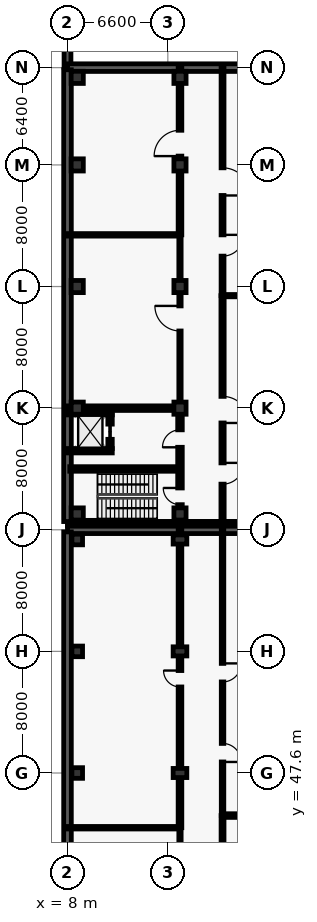
"""IFC4 building model, lengths in metres.
Left out: names, types, materials, properties, quantities, classifications, styles, units other than length and angle.
Written with IfcOpenShell. Run it as: python <this file> out.ifc"""

import sys

from ifc_helpers import new_model, si_unit, direction, frame, frame_2d, origin, origin_2d, place, context, subcontext, project, spatial, rectangle, extrude, element, fill, save


model = new_model("IFC4")
c1 = context("Model", 3, precision=1e-05, world=origin(), true_north=direction((0.0, 1.0)))
c2 = subcontext(c1, "Body", "Model", "MODEL_VIEW")
j1 = project(units=[si_unit("LENGTHUNIT", "METRE"), si_unit("PLANEANGLEUNIT", "RADIAN")], contexts=[c1])
p1 = place(None, origin())
s1 = spatial("IfcSite", under=j1, at=p1, CompositionType="ELEMENT")
p2 = place(p1, origin())
s2 = spatial("IfcBuilding", under=s1, at=p2, CompositionType="ELEMENT")
p3 = place(p2, frame((0.0, 0.0, -4.8)))
s3 = spatial("IfcBuildingStorey", under=s2, at=p3, CompositionType="ELEMENT", Elevation=-4.8)
for number, where, z_axis, x_axis in (
    (1, (8.64, 47.6, 0.0), (0.0, 0.0, 1.0), (1.0, 0.0, 0.0)),
    (2, (8.64, 55.6, 0.0), (0.0, 0.0, 1.0), (1.0, 0.0, 0.0)),
    (3, (8.64, 62.96, 0.0), (0.0, 0.0, 1.0), (1.0, 0.0, 0.0)),
):
    element("IfcColumn", number, at=place(p3, frame(where, z_axis=z_axis, x_axis=x_axis)), inside=s3, PredefinedType="COLUMN", context=c2, shape_type="SweptSolid", body=[
        extrude(rectangle(XDim=0.7, YDim=0.7, at=origin_2d()), origin(), (0.0, 0.0, 1.0), 4.8),
    ])
for number, where, z_axis, x_axis in (
    (4, (15.4, 47.6, 0.0), (0.0, 0.0, 1.0), (1.0, 0.0, 0.0)),
    (5, (15.4, 55.6, 0.0), (0.0, 0.0, 1.0), (1.0, 0.0, 0.0)),
    (6, (15.4, 62.96, 0.0), (0.0, 0.0, 1.0), (1.0, 0.0, 0.0)),
):
    element("IfcColumn", number, at=place(p3, frame(where, z_axis=z_axis, x_axis=x_axis)), inside=s3, PredefinedType="COLUMN", context=c2, shape_type="SweptSolid", body=[
        extrude(rectangle(XDim=0.6, YDim=0.9, at=origin_2d()), origin(), (0.0, 0.0, 1.0), 4.8),
    ])
for number, where, z_axis, x_axis in (
    (7, (8.64, 64.64, 0.0), (0.0, 0.0, 1.0), (1.0, 0.0, 0.0)),
    (8, (8.64, 71.6, 0.0), (0.0, 0.0, 1.0), (1.0, 0.0, 0.0)),
    (9, (8.64, 79.6, 0.0), (0.0, 0.0, 1.0), (1.0, 0.0, 0.0)),
    (10, (8.64, 87.6, 0.0), (0.0, 0.0, 1.0), (1.0, 0.0, 0.0)),
    (11, (8.64, 93.36, 0.0), (0.0, 0.0, 1.0), (1.0, 0.0, 0.0)),
    (12, (15.4, 64.64, 0.0), (0.0, 0.0, 1.0), (1.0, 0.0, 0.0)),
    (13, (15.4, 71.6, 0.0), (0.0, 0.0, 1.0), (1.0, 0.0, 0.0)),
    (14, (15.4, 79.6, 0.0), (0.0, 0.0, 1.0), (1.0, 0.0, 0.0)),
    (15, (15.4, 87.6, 0.0), (0.0, 0.0, 1.0), (1.0, 0.0, 0.0)),
    (16, (15.4, 93.36, 0.0), (0.0, 0.0, 1.0), (1.0, 0.0, 0.0)),
):
    element("IfcColumn", number, at=place(p3, frame(where, z_axis=z_axis, x_axis=x_axis)), inside=s3, PredefinedType="COLUMN", context=c2, shape_type="SweptSolid", body=[
        extrude(rectangle(XDim=0.8, YDim=0.8, at=origin_2d()), origin(), (0.0, 0.0, 1.0), 4.8),
    ])
p4 = place(p3, frame((8.0, 94.02, 0.0), z_axis=(0.0, 0.0, 1.0), x_axis=(0.0, 1.0, 0.0)))
e17 = element("IfcWall", 17, at=p4, inside=s3, PredefinedType="USERDEFINED", context=c2, shape_type="SweptSolid", body=[
    extrude(rectangle(XDim=7.96, YDim=0.45, at=frame_2d((3.98, 0.0))), origin(), (0.0, 0.0, 1.0), 4.53),
])
p5 = place(p3, frame((8.0, 63.6, 0.0), z_axis=(0.0, 0.0, 1.0), x_axis=(1.0, 0.0, 0.0)))
e18 = element("IfcWall", 18, at=p5, inside=s3, PredefinedType="USERDEFINED", context=c2, shape_type="SweptSolid", body=[
    extrude(rectangle(XDim=38.0, YDim=0.5, at=frame_2d((19.0, 0.0))), origin(), (0.0, 0.0, 1.0), 4.5),
])
p6 = place(p3, frame((8.0, 7.74, 0.0), z_axis=(0.0, 0.0, 1.0), x_axis=(0.0, 1.0, 0.0)))
e19 = element("IfcWall", 19, at=p6, inside=s3, PredefinedType="USERDEFINED", context=c2, shape_type="SweptSolid", body=[
    extrude(rectangle(XDim=55.72, YDim=0.5, at=frame_2d((27.86, 0.0))), origin(), (0.0, 0.0, 1.0), 4.5),
])
p7 = place(p3, frame((8.0, 94.0, 0.0), z_axis=(0.0, 0.0, 1.0), x_axis=(1.0, 0.0, 0.0)))
e20 = element("IfcWall", 20, at=p7, inside=s3, PredefinedType="USERDEFINED", context=c2, shape_type="SweptSolid", body=[
    extrude(rectangle(XDim=32.2, YDim=0.5, at=frame_2d((16.1, 0.0))), origin(), (0.0, 0.0, 1.0), 4.5),
])
p8 = place(p3, frame((40.2, 64.0, 0.0), z_axis=(0.0, 0.0, 1.0), x_axis=(-1.0, 0.0, 0.0)))
e21 = element("IfcWall", 21, at=p8, inside=s3, PredefinedType="SHEAR", context=c2, shape_type="SweptSolid", body=[
    extrude(rectangle(XDim=32.2, YDim=0.3, at=frame_2d((16.1, 0.0))), origin(), (0.0, 0.0, 1.0), 4.5),
])
p9 = place(p3, frame((8.0, 64.14, 0.0), z_axis=(0.0, 0.0, 1.0), x_axis=(0.0, 1.0, 0.0)))
e22 = element("IfcWall", 22, at=p9, inside=s3, PredefinedType="USERDEFINED", context=c2, shape_type="SweptSolid", body=[
    extrude(rectangle(XDim=29.72, YDim=0.5, at=frame_2d((14.86, 0.0))), origin(), (0.0, 0.0, 1.0), 4.5),
])
p10 = place(p3, frame((7.85, 71.6, 0.0), z_axis=(0.0, 0.0, 1.0), x_axis=(1.0, 0.0, 0.0)))
e23 = element("IfcWall", 23, at=p10, inside=s3, PredefinedType="SHEAR", context=c2, shape_type="SweptSolid", body=[
    extrude(rectangle(XDim=7.148, YDim=0.3, at=frame_2d((3.574, 0.0))), origin(), (0.0, 0.0, 1.0), 4.5),
])
p11 = place(p3, frame((15.4, 64.15, 0.0), z_axis=(0.0, 0.0, 1.0), x_axis=(0.0, 1.0, 0.0)))
e24 = element("IfcWall", 24, at=p11, inside=s3, PredefinedType="SHEAR", context=c2, shape_type="SweptSolid", body=[
    extrude(rectangle(XDim=7.048, YDim=0.3, at=frame_2d((3.524, 0.0))), origin(), (0.0, 0.0, 1.0), 4.5),
])
p12 = place(p11, frame((1.1, 0.0, 0.0)))
e25 = element("IfcOpeningElement", 25, at=p12, cuts=e24, PredefinedType="OPENING", context=c2, shape_type="SweptSolid", body=[
    extrude(rectangle(XDim=1.1, YDim=2.15, at=frame_2d((0.55, 1.075))), frame((0.0, 0.16, 0.0), z_axis=(0.0, -1.0, 0.0), x_axis=(1.0, 0.0, 0.0)), (0.0, 0.0, 1.0), 0.32),
])
p13 = place(p11, frame((4.875, 0.0, 0.0)))
e26 = element("IfcOpeningElement", 26, at=p13, cuts=e24, PredefinedType="OPENING", context=c2, shape_type="SweptSolid", body=[
    extrude(rectangle(XDim=1.15, YDim=2.2, at=frame_2d((0.575, 1.1))), frame((0.0, 0.16, 0.0), z_axis=(0.0, -1.0, 0.0), x_axis=(1.0, 0.0, 0.0)), (0.0, 0.0, 1.0), 0.32),
])
p14 = place(p3, frame((8.15, 67.6, 0.0), z_axis=(0.0, 0.0, 1.0), x_axis=(1.0, 0.0, 0.0)))
e27 = element("IfcWall", 27, at=p14, inside=s3, PredefinedType="SHEAR", context=c2, shape_type="SweptSolid", body=[
    extrude(rectangle(XDim=7.1, YDim=0.3, at=frame_2d((3.55, 0.0))), origin(), (0.0, 0.0, 1.0), 4.5),
])
for number, where, z_axis, x_axis in (
    (28, (8.055, 68.8, 0.0), (0.0, 0.0, 1.0), (1.0, 0.0, 0.0)),
    (29, (8.055, 71.3, 0.0), (0.0, 0.0, 1.0), (1.0, 0.0, 0.0)),
):
    element("IfcWall", number, at=place(p3, frame(where, z_axis=z_axis, x_axis=x_axis)), inside=s3, PredefinedType="SHEAR", context=c2, shape_type="SweptSolid", body=[
        extrude(rectangle(XDim=2.89, YDim=0.29, at=frame_2d((1.445, 0.0))), origin(), (0.0, 0.0, 1.0), 4.5),
    ])
p15 = place(p3, frame((10.8, 68.945, 0.0), z_axis=(0.0, 0.0, 1.0), x_axis=(0.0, 1.0, 0.0)))
e30 = element("IfcWall", 30, at=p15, inside=s3, PredefinedType="SHEAR", context=c2, shape_type="SweptSolid", body=[
    extrude(rectangle(XDim=2.21, YDim=0.29, at=frame_2d((1.105, 0.0))), origin(), (0.0, 0.0, 1.0), 4.5),
])
p16 = place(p15, frame((0.605, 0.0, 0.0)))
e31 = element("IfcOpeningElement", 31, at=p16, cuts=e30, PredefinedType="OPENING", context=c2, shape_type="SweptSolid", body=[
    extrude(rectangle(XDim=1.0, YDim=2.15, at=frame_2d((0.5, 1.075))), frame((0.0, 0.155, 0.0), z_axis=(0.0, -1.0, 0.0), x_axis=(1.0, 0.0, 0.0)), (0.0, 0.0, 1.0), 0.31),
])
p17 = place(p3, frame((15.4, 26.4, 0.0), z_axis=(0.0, 0.0, 1.0), x_axis=(0.0, 1.0, 0.0)))
e32 = element("IfcWall", 32, at=p17, inside=s3, PredefinedType="PARTITIONING", context=c2, shape_type="SweptSolid", body=[
    extrude(rectangle(XDim=17.6, YDim=0.15, at=frame_2d((8.8, 0.0))), origin(), (0.0, 0.0, 1.0), 3.65),
])
p18 = place(p17, frame((8.3, 0.0, 0.0)))
e33 = element("IfcOpeningElement", 33, at=p18, cuts=e32, PredefinedType="OPENING", context=c2, shape_type="SweptSolid", body=[
    extrude(rectangle(XDim=1.0, YDim=2.1, at=frame_2d((0.5, 1.05))), frame((0.0, 0.085, 0.0), z_axis=(0.0, -1.0, 0.0), x_axis=(1.0, 0.0, 0.0)), (0.0, 0.0, 1.0), 0.17),
])
p19 = place(p3, frame((15.4, 44.0, 0.0), z_axis=(0.0, 0.0, 1.0), x_axis=(0.0, 1.0, 0.0)))
e34 = element("IfcWall", 34, at=p19, inside=s3, PredefinedType="PARTITIONING", context=c2, shape_type="SweptSolid", body=[
    extrude(rectangle(XDim=19.6, YDim=0.24, at=frame_2d((9.8, 0.0))), origin(), (0.0, 0.0, 1.0), 3.65),
])
p20 = place(p19, frame((9.26, 0.0, 0.0)))
e35 = element("IfcOpeningElement", 35, at=p20, cuts=e34, PredefinedType="OPENING", context=c2, shape_type="SweptSolid", body=[
    extrude(rectangle(XDim=1.08, YDim=2.15, at=frame_2d((0.54, 1.075))), frame((0.0, 0.13, 0.0), z_axis=(0.0, -1.0, 0.0), x_axis=(1.0, 0.0, 0.0)), (0.0, 0.0, 1.0), 0.26),
])
p21 = place(p3, frame((18.2, 44.8, 0.0), z_axis=(0.0, 0.0, 1.0), x_axis=(0.0, -1.0, 0.0)))
e36 = element("IfcWall", 36, at=p21, inside=s3, PredefinedType="PARTITIONING", context=c2, shape_type="SweptSolid", body=[
    extrude(rectangle(XDim=18.8, YDim=0.19, at=frame_2d((9.4, 0.0))), origin(), (0.0, 0.0, 1.0), 4.5),
])
p22 = place(p21, frame((8.81, 0.0, 0.0)))
e37 = element("IfcOpeningElement", 37, at=p22, cuts=e36, PredefinedType="OPENING", context=c2, shape_type="SweptSolid", body=[
    extrude(rectangle(XDim=1.18, YDim=2.15, at=frame_2d((0.59, 1.075))), frame((0.0, 0.105, 0.0), z_axis=(0.0, -1.0, 0.0), x_axis=(1.0, 0.0, 0.0)), (0.0, 0.0, 1.0), 0.21),
])
p23 = place(p21, frame((13.964, 0.0, 0.0)))
e38 = element("IfcOpeningElement", 38, at=p23, cuts=e36, PredefinedType="OPENING", context=c2, shape_type="SweptSolid", body=[
    extrude(rectangle(XDim=1.4, YDim=2.25, at=frame_2d((0.7, 1.125))), frame((0.0, 0.105, 0.0), z_axis=(0.0, -1.0, 0.0), x_axis=(1.0, 0.0, 0.0)), (0.0, 0.0, 1.0), 0.21),
])
p24 = place(p3, frame((18.2, 63.6, 0.0), z_axis=(0.0, 0.0, 1.0), x_axis=(0.0, -1.0, 0.0)))
e39 = element("IfcWall", 39, at=p24, inside=s3, PredefinedType="PARTITIONING", context=c2, shape_type="SweptSolid", body=[
    extrude(rectangle(XDim=18.8, YDim=0.165, at=frame_2d((9.4, 0.0))), origin(), (0.0, 0.0, 1.0), 4.5),
])
p25 = place(p24, frame((8.79, 0.0, 0.0)))
e40 = element("IfcOpeningElement", 40, at=p25, cuts=e39, PredefinedType="OPENING", context=c2, shape_type="SweptSolid", body=[
    extrude(rectangle(XDim=1.22, YDim=2.2, at=frame_2d((0.61, 1.1))), frame((0.0, 0.093, 0.0), z_axis=(0.0, -1.0, 0.0), x_axis=(1.0, 0.0, 0.0)), (0.0, 0.0, 1.0), 0.185),
])
p26 = place(p24, frame((14.054, 0.0, 0.0)))
e41 = element("IfcOpeningElement", 41, at=p26, cuts=e39, PredefinedType="OPENING", context=c2, shape_type="SweptSolid", body=[
    extrude(rectangle(XDim=1.22, YDim=2.2, at=frame_2d((0.61, 1.1))), frame((0.0, 0.093, 0.0), z_axis=(0.0, -1.0, 0.0), x_axis=(1.0, 0.0, 0.0)), (0.0, 0.0, 1.0), 0.185),
])
p27 = place(p3, frame((8.0, 44.0, 0.0), z_axis=(0.0, 0.0, 1.0), x_axis=(1.0, 0.0, 0.0)))
e42 = element("IfcWall", 42, at=p27, inside=s3, PredefinedType="PARTITIONING", context=c2, shape_type="SweptSolid", body=[
    extrude(rectangle(XDim=7.4, YDim=0.165, at=frame_2d((3.7, 0.0))), origin(), (0.0, 0.0, 1.0), 4.5),
])
p28 = place(p3, frame((18.2, 44.8, 0.0), z_axis=(0.0, 0.0, 1.0), x_axis=(1.0, 0.0, 0.0)))
e43 = element("IfcWall", 43, at=p28, inside=s3, PredefinedType="PARTITIONING", context=c2, shape_type="SweptSolid", body=[
    extrude(rectangle(XDim=27.8, YDim=0.24, at=frame_2d((13.9, 0.0))), origin(), (0.0, 0.0, 1.0), 4.5),
])
p29 = place(p3, frame((15.4, 72.002, 0.0), z_axis=(0.0, 0.0, 1.0), x_axis=(0.0, 1.0, 0.0)))
e44 = element("IfcWall", 44, at=p29, inside=s3, PredefinedType="PARTITIONING", context=c2, shape_type="SweptSolid", body=[
    extrude(rectangle(XDim=10.998, YDim=0.15, at=frame_2d((5.499, 0.0))), origin(), (0.0, 0.0, 1.0), 3.65),
])
p30 = place(p29, frame((4.674, 0.0, 0.0)))
e45 = element("IfcOpeningElement", 45, at=p30, cuts=e44, PredefinedType="OPENING", context=c2, shape_type="SweptSolid", body=[
    extrude(rectangle(XDim=1.65, YDim=2.3, at=frame_2d((0.825, 1.15))), frame((0.0, 0.085, 0.0), z_axis=(0.0, -1.0, 0.0), x_axis=(1.0, 0.0, 0.0)), (0.0, 0.0, 1.0), 0.17),
])
p31 = place(p3, frame((15.4, 83.0, 0.0), z_axis=(0.0, 0.0, 1.0), x_axis=(0.0, 1.0, 0.0)))
e46 = element("IfcWall", 46, at=p31, inside=s3, PredefinedType="PARTITIONING", context=c2, shape_type="SweptSolid", body=[
    extrude(rectangle(XDim=11.0, YDim=0.24, at=frame_2d((5.5, 0.0))), origin(), (0.0, 0.0, 1.0), 3.65),
])
p32 = place(p31, frame((5.18, 0.0, 0.0)))
e47 = element("IfcOpeningElement", 47, at=p32, cuts=e46, PredefinedType="OPENING", context=c2, shape_type="SweptSolid", body=[
    extrude(rectangle(XDim=1.7, YDim=2.3, at=frame_2d((0.85, 1.15))), frame((0.0, 0.13, 0.0), z_axis=(0.0, -1.0, 0.0), x_axis=(1.0, 0.0, 0.0)), (0.0, 0.0, 1.0), 0.26),
])
p33 = place(p3, frame((18.2, 79.0, 0.0), z_axis=(0.0, 0.0, 1.0), x_axis=(0.0, -1.0, 0.0)))
e48 = element("IfcWall", 48, at=p33, inside=s3, PredefinedType="PARTITIONING", context=c2, shape_type="SweptSolid", body=[
    extrude(rectangle(XDim=15.0, YDim=0.21, at=frame_2d((7.5, 0.0))), origin(), (0.0, 0.0, 1.0), 4.5),
])
p34 = place(p33, frame((6.625, 0.0, 0.0)))
e49 = element("IfcOpeningElement", 49, at=p34, cuts=e48, PredefinedType="OPENING", context=c2, shape_type="SweptSolid", body=[
    extrude(rectangle(XDim=1.75, YDim=2.35, at=frame_2d((0.875, 1.175))), frame((0.0, 0.115, 0.0), z_axis=(0.0, -1.0, 0.0), x_axis=(1.0, 0.0, 0.0)), (0.0, 0.0, 1.0), 0.23),
])
p35 = place(p33, frame((11.0, 0.0, 0.0)))
e50 = element("IfcOpeningElement", 50, at=p35, cuts=e48, PredefinedType="OPENING", context=c2, shape_type="SweptSolid", body=[
    extrude(rectangle(XDim=1.4, YDim=2.25, at=frame_2d((0.7, 1.125))), frame((0.0, 0.115, 0.0), z_axis=(0.0, -1.0, 0.0), x_axis=(1.0, 0.0, 0.0)), (0.0, 0.0, 1.0), 0.23),
])
p36 = place(p3, frame((18.2, 94.0, 0.0), z_axis=(0.0, 0.0, 1.0), x_axis=(0.0, -1.0, 0.0)))
e51 = element("IfcWall", 51, at=p36, inside=s3, PredefinedType="PARTITIONING", context=c2, shape_type="SweptSolid", body=[
    extrude(rectangle(XDim=15.0, YDim=0.19, at=frame_2d((7.5, 0.0))), origin(), (0.0, 0.0, 1.0), 4.5),
])
p37 = place(p36, frame((6.59, 0.0, 0.0)))
e52 = element("IfcOpeningElement", 52, at=p37, cuts=e51, PredefinedType="OPENING", context=c2, shape_type="SweptSolid", body=[
    extrude(rectangle(XDim=1.82, YDim=2.35, at=frame_2d((0.91, 1.175))), frame((0.0, 0.105, 0.0), z_axis=(0.0, -1.0, 0.0), x_axis=(1.0, 0.0, 0.0)), (0.0, 0.0, 1.0), 0.21),
])
p38 = place(p36, frame((11.0, 0.0, 0.0)))
e53 = element("IfcOpeningElement", 53, at=p38, cuts=e51, PredefinedType="OPENING", context=c2, shape_type="SweptSolid", body=[
    extrude(rectangle(XDim=1.4, YDim=2.25, at=frame_2d((0.7, 1.125))), frame((0.0, 0.105, 0.0), z_axis=(0.0, -1.0, 0.0), x_axis=(1.0, 0.0, 0.0)), (0.0, 0.0, 1.0), 0.21),
])
p39 = place(p3, frame((8.0, 83.0, 0.0), z_axis=(0.0, 0.0, 1.0), x_axis=(1.0, 0.0, 0.0)))
e54 = element("IfcWall", 54, at=p39, inside=s3, PredefinedType="PARTITIONING", context=c2, shape_type="SweptSolid", body=[
    extrude(rectangle(XDim=7.4, YDim=0.165, at=frame_2d((3.7, 0.0))), origin(), (0.0, 0.0, 1.0), 4.5),
])
p40 = place(p3, frame((18.2, 79.0, 0.0), z_axis=(0.0, 0.0, 1.0), x_axis=(1.0, 0.0, 0.0)))
e55 = element("IfcWall", 55, at=p40, inside=s3, PredefinedType="PARTITIONING", context=c2, shape_type="SweptSolid", body=[
    extrude(rectangle(XDim=22.0, YDim=0.15, at=frame_2d((11.0, 0.0))), origin(), (0.0, 0.0, 1.0), 4.5),
])
p41 = place(p12, origin())
e56 = element("IfcDoor", 56, at=p41, inside=s3, OperationType="SINGLE_SWING_RIGHT", PredefinedType="DOOR", context=c2, shape_type="SweptSolid", body=[
    extrude(rectangle(XDim=1.1, YDim=2.15, at=frame_2d((0.55, 1.075))), frame((0.0, 0.025, 0.0), z_axis=(0.0, -1.0, 0.0), x_axis=(1.0, 0.0, 0.0)), (0.0, 0.0, 1.0), 0.05),
])
fill(e25, e56)
p42 = place(p13, origin())
e57 = element("IfcDoor", 57, at=p42, inside=s3, OperationType="SINGLE_SWING_LEFT", PredefinedType="DOOR", context=c2, shape_type="SweptSolid", body=[
    extrude(rectangle(XDim=1.15, YDim=2.2, at=frame_2d((0.575, 1.1))), frame((0.0, 0.025, 0.0), z_axis=(0.0, -1.0, 0.0), x_axis=(1.0, 0.0, 0.0)), (0.0, 0.0, 1.0), 0.05),
])
fill(e26, e57)
p43 = place(p16, origin())
e58 = element("IfcDoor", 58, at=p43, inside=s3, OperationType="SLIDING_TO_LEFT", PredefinedType="DOOR", context=c2, shape_type="SweptSolid", body=[
    extrude(rectangle(XDim=1.0, YDim=2.15, at=frame_2d((0.5, 1.075))), frame((0.0, 0.025, 0.0), z_axis=(0.0, -1.0, 0.0), x_axis=(1.0, 0.0, 0.0)), (0.0, 0.0, 1.0), 0.05),
])
fill(e31, e58)
p44 = place(p20, origin())
e59 = element("IfcDoor", 59, at=p44, inside=s3, OperationType="SINGLE_SWING_RIGHT", PredefinedType="DOOR", context=c2, shape_type="SweptSolid", body=[
    extrude(rectangle(XDim=1.08, YDim=2.15, at=frame_2d((0.54, 1.075))), frame((0.0, 0.025, 0.0), z_axis=(0.0, -1.0, 0.0), x_axis=(1.0, 0.0, 0.0)), (0.0, 0.0, 1.0), 0.05),
])
fill(e35, e59)
p45 = place(p25, origin())
e60 = element("IfcDoor", 60, at=p45, inside=s3, OperationType="SINGLE_SWING_LEFT", PredefinedType="DOOR", context=c2, shape_type="SweptSolid", body=[
    extrude(rectangle(XDim=1.22, YDim=2.2, at=frame_2d((0.61, 1.1))), frame((0.0, 0.025, 0.0), z_axis=(0.0, -1.0, 0.0), x_axis=(1.0, 0.0, 0.0)), (0.0, 0.0, 1.0), 0.05),
])
fill(e40, e60)
p46 = place(p26, origin())
e61 = element("IfcDoor", 61, at=p46, inside=s3, OperationType="SINGLE_SWING_RIGHT", PredefinedType="DOOR", context=c2, shape_type="SweptSolid", body=[
    extrude(rectangle(XDim=1.22, YDim=2.2, at=frame_2d((0.61, 1.1))), frame((0.0, 0.025, 0.0), z_axis=(0.0, -1.0, 0.0), x_axis=(1.0, 0.0, 0.0)), (0.0, 0.0, 1.0), 0.05),
])
fill(e41, e61)
p47 = place(p30, origin())
e62 = element("IfcDoor", 62, at=p47, inside=s3, OperationType="SINGLE_SWING_RIGHT", PredefinedType="DOOR", context=c2, shape_type="SweptSolid", body=[
    extrude(rectangle(XDim=1.65, YDim=2.3, at=frame_2d((0.825, 1.15))), frame((0.0, 0.025, 0.0), z_axis=(0.0, -1.0, 0.0), x_axis=(1.0, 0.0, 0.0)), (0.0, 0.0, 1.0), 0.05),
])
fill(e45, e62)
p48 = place(p32, origin())
e63 = element("IfcDoor", 63, at=p48, inside=s3, OperationType="SINGLE_SWING_LEFT", PredefinedType="DOOR", context=c2, shape_type="SweptSolid", body=[
    extrude(rectangle(XDim=1.7, YDim=2.3, at=frame_2d((0.85, 1.15))), frame((0.0, 0.025, 0.0), z_axis=(0.0, -1.0, 0.0), x_axis=(1.0, 0.0, 0.0)), (0.0, 0.0, 1.0), 0.05),
])
fill(e47, e63)
p49 = place(p34, origin())
e64 = element("IfcDoor", 64, at=p49, inside=s3, OperationType="SINGLE_SWING_RIGHT", PredefinedType="DOOR", context=c2, shape_type="SweptSolid", body=[
    extrude(rectangle(XDim=1.75, YDim=2.35, at=frame_2d((0.875, 1.175))), frame((0.0, 0.025, 0.0), z_axis=(0.0, -1.0, 0.0), x_axis=(1.0, 0.0, 0.0)), (0.0, 0.0, 1.0), 0.05),
])
fill(e49, e64)
p50 = place(p35, origin())
e65 = element("IfcDoor", 65, at=p50, inside=s3, OperationType="SINGLE_SWING_LEFT", PredefinedType="DOOR", context=c2, shape_type="SweptSolid", body=[
    extrude(rectangle(XDim=1.4, YDim=2.25, at=frame_2d((0.7, 1.125))), frame((0.0, 0.025, 0.0), z_axis=(0.0, -1.0, 0.0), x_axis=(1.0, 0.0, 0.0)), (0.0, 0.0, 1.0), 0.05),
])
fill(e50, e65)
p51 = place(p37, origin())
e66 = element("IfcDoor", 66, at=p51, inside=s3, OperationType="SINGLE_SWING_RIGHT", PredefinedType="DOOR", context=c2, shape_type="SweptSolid", body=[
    extrude(rectangle(XDim=1.82, YDim=2.35, at=frame_2d((0.91, 1.175))), frame((0.0, 0.025, 0.0), z_axis=(0.0, -1.0, 0.0), x_axis=(1.0, 0.0, 0.0)), (0.0, 0.0, 1.0), 0.05),
])
fill(e52, e66)
p52 = place(p38, origin())
e67 = element("IfcDoor", 67, at=p52, inside=s3, OperationType="SINGLE_SWING_LEFT", PredefinedType="DOOR", context=c2, shape_type="SweptSolid", body=[
    extrude(rectangle(XDim=1.4, YDim=2.25, at=frame_2d((0.7, 1.125))), frame((0.0, 0.025, 0.0), z_axis=(0.0, -1.0, 0.0), x_axis=(1.0, 0.0, 0.0)), (0.0, 0.0, 1.0), 0.05),
])
fill(e53, e67)
save(model, sys.argv[1])
